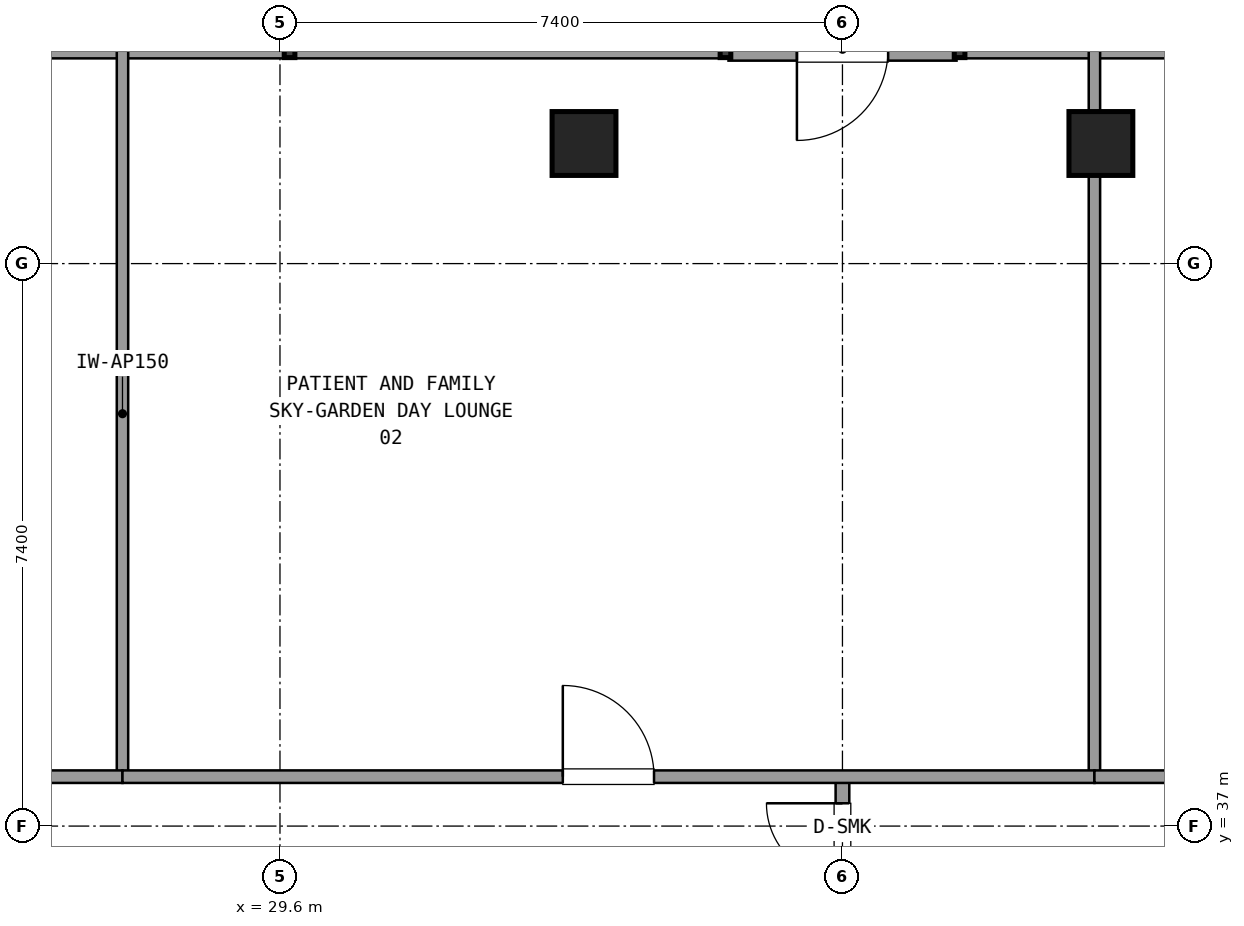
"""IFC4 building model, lengths in metres.
Left out: names, types, materials, properties, quantities, classifications, styles, units other than length and angle.
Written with IfcOpenShell. Run it as: python <this file> out.ifc"""

import sys

from ifc_helpers import new_model, si_unit, direction, frame, frame_2d, origin, origin_2d, place, context, subcontext, project, spatial, rectangle, extrude, element, fill, save


model = new_model("IFC4")
c1 = context("Model", 3, precision=1e-05, world=origin(), true_north=direction((0.0, 1.0)))
c2 = subcontext(c1, "Body", "Model", "MODEL_VIEW")
j1 = project(units=[si_unit("LENGTHUNIT", "METRE"), si_unit("PLANEANGLEUNIT", "RADIAN")], contexts=[c1])
p1 = place(None, origin())
s1 = spatial("IfcSite", under=j1, at=p1, CompositionType="ELEMENT")
p2 = place(p1, origin())
s2 = spatial("IfcBuilding", under=s1, at=p2, CompositionType="ELEMENT")
p3 = place(p2, frame((0.0, 0.0, 275.22)))
s3 = spatial("IfcBuildingStorey", under=s2, at=p3, CompositionType="ELEMENT", Elevation=275.22)
for number, where, z_axis, x_axis in (
    (1, (40.4, 45.98, 0.0), (0.0, 0.0, 1.0), (1.0, 0.0, 0.0)),
    (2, (33.6, 45.98, 0.0), (0.0, 0.0, 1.0), (1.0, 0.0, 0.0)),
):
    element("IfcColumn", number, at=place(p3, frame(where, z_axis=z_axis, x_axis=x_axis)), inside=s3, PredefinedType="COLUMN", context=c2, shape_type="SweptSolid", body=[
        extrude(rectangle(XDim=0.84, YDim=0.84, at=origin_2d()), origin(), (0.0, 0.0, 1.0), 3.6),
    ])
p4 = place(p3, frame((38.501, 47.22, 0.0), z_axis=(0.0, 0.0, 1.0), x_axis=(-1.0, 0.0, 0.0)))
e3 = element("IfcWall", 3, at=p4, inside=s3, PredefinedType="SOLIDWALL", context=c2, shape_type="SweptSolid", body=[
    extrude(rectangle(XDim=3.0, YDim=0.3, at=frame_2d((1.5, 0.0))), origin(), (0.0, 0.0, 1.0), 2.69),
])
p5 = place(p4, frame((0.9, 0.0, 0.0)))
e4 = element("IfcOpeningElement", 4, at=p5, cuts=e3, PredefinedType="OPENING", context=c2, shape_type="SweptSolid", body=[
    extrude(rectangle(XDim=1.2, YDim=2.2, at=frame_2d((0.6, 1.1))), frame((0.0, 0.16, 0.0), z_axis=(0.0, -1.0, 0.0), x_axis=(1.0, 0.0, 0.0)), (0.0, 0.0, 1.0), 0.32),
])
p6 = place(p3, frame((55.745, 47.22, 0.0), z_axis=(0.0, 0.0, 1.0), x_axis=(-1.0, 0.0, 0.0)))
e5 = element("IfcWall", 5, at=p6, inside=s3, PredefinedType="SOLIDWALL", context=c2, shape_type="SweptSolid", body=[
    extrude(rectangle(XDim=17.204, YDim=0.24, at=frame_2d((8.602, 0.0))), origin(), (0.0, 0.0, 1.0), 0.85),
])
p7 = place(p3, frame((35.461, 47.22, 0.0), z_axis=(0.0, 0.0, 1.0), x_axis=(-1.0, 0.0, 0.0)))
e6 = element("IfcWall", 6, at=p7, inside=s3, PredefinedType="SOLIDWALL", context=c2, shape_type="SweptSolid", body=[
    extrude(rectangle(XDim=17.206, YDim=0.24, at=frame_2d((8.603, 0.0))), origin(), (0.0, 0.0, 1.0), 0.85),
])
p8 = place(p3, frame((37.0, 34.95, 0.0), z_axis=(0.0, 0.0, 1.0), x_axis=(0.0, 1.0, 0.0)))
e7 = element("IfcWall", 7, at=p8, inside=s3, PredefinedType="PARTITIONING", context=c2, shape_type="SweptSolid", body=[
    extrude(rectangle(XDim=2.7, YDim=0.18, at=frame_2d((1.35, 0.0))), origin(), (0.0, 0.0, 1.0), 2.61),
])
p9 = place(p8, frame((0.35, 0.0, 0.0)))
e8 = element("IfcOpeningElement", 8, at=p9, cuts=e7, PredefinedType="OPENING", context=c2, shape_type="SweptSolid", body=[
    extrude(rectangle(XDim=2.0, YDim=2.2, at=frame_2d((1.0, 1.1))), frame((0.0, 0.1, 0.0), z_axis=(0.0, -1.0, 0.0), x_axis=(1.0, 0.0, 0.0)), (0.0, 0.0, 1.0), 0.2),
])
p10 = place(p3, frame((27.528, 37.65, 0.0), z_axis=(0.0, 0.0, 1.0), x_axis=(0.0, 1.0, 0.0)))
e9 = element("IfcWall", 9, at=p10, inside=s3, PredefinedType="PARTITIONING", context=c2, shape_type="SweptSolid", body=[
    extrude(rectangle(XDim=9.55, YDim=0.15, at=frame_2d((4.775, 0.0))), origin(), (0.0, 0.0, 1.0), 2.61),
])
p11 = place(p3, frame((21.1, 37.65, 0.0), z_axis=(0.0, 0.0, 1.0), x_axis=(1.0, 0.0, 0.0)))
e10 = element("IfcWall", 10, at=p11, inside=s3, PredefinedType="PARTITIONING", context=c2, shape_type="SweptSolid", body=[
    extrude(rectangle(XDim=6.428, YDim=0.165, at=frame_2d((3.214, 0.0))), origin(), (0.0, 0.0, 1.0), 2.61),
])
p12 = place(p11, frame((2.614, 0.0, 0.0)))
e11 = element("IfcOpeningElement", 11, at=p12, cuts=e10, PredefinedType="OPENING", context=c2, shape_type="SweptSolid", body=[
    extrude(rectangle(XDim=1.2, YDim=2.15, at=frame_2d((0.6, 1.075))), frame((0.0, 0.093, 0.0), z_axis=(0.0, -1.0, 0.0), x_axis=(1.0, 0.0, 0.0)), (0.0, 0.0, 1.0), 0.185),
])
p13 = place(p3, frame((40.315, 37.65, 0.0), z_axis=(0.0, 0.0, 1.0), x_axis=(0.0, 1.0, 0.0)))
e12 = element("IfcWall", 12, at=p13, inside=s3, PredefinedType="PARTITIONING", context=c2, shape_type="SweptSolid", body=[
    extrude(rectangle(XDim=9.55, YDim=0.15, at=frame_2d((4.775, 0.0))), origin(), (0.0, 0.0, 1.0), 2.61),
])
p14 = place(p3, frame((27.528, 37.65, 0.0), z_axis=(0.0, 0.0, 1.0), x_axis=(1.0, 0.0, 0.0)))
e13 = element("IfcWall", 13, at=p14, inside=s3, PredefinedType="PARTITIONING", context=c2, shape_type="SweptSolid", body=[
    extrude(rectangle(XDim=12.787, YDim=0.165, at=frame_2d((6.394, 0.0))), origin(), (0.0, 0.0, 1.0), 2.61),
])
p15 = place(p14, frame((5.793, 0.0, 0.0)))
e14 = element("IfcOpeningElement", 14, at=p15, cuts=e13, PredefinedType="OPENING", context=c2, shape_type="SweptSolid", body=[
    extrude(rectangle(XDim=1.2, YDim=2.15, at=frame_2d((0.6, 1.075))), frame((0.0, 0.093, 0.0), z_axis=(0.0, -1.0, 0.0), x_axis=(1.0, 0.0, 0.0)), (0.0, 0.0, 1.0), 0.185),
])
p16 = place(p3, frame((40.315, 37.65, 0.0), z_axis=(0.0, 0.0, 1.0), x_axis=(1.0, 0.0, 0.0)))
e15 = element("IfcWall", 15, at=p16, inside=s3, PredefinedType="PARTITIONING", context=c2, shape_type="SweptSolid", body=[
    extrude(rectangle(XDim=10.035, YDim=0.165, at=frame_2d((5.018, 0.0))), origin(), (0.0, 0.0, 1.0), 2.61),
])
p17 = place(p16, frame((4.418, 0.0, 0.0)))
e16 = element("IfcOpeningElement", 16, at=p17, cuts=e15, PredefinedType="OPENING", context=c2, shape_type="SweptSolid", body=[
    extrude(rectangle(XDim=1.2, YDim=2.15, at=frame_2d((0.6, 1.075))), frame((0.0, 0.093, 0.0), z_axis=(0.0, -1.0, 0.0), x_axis=(1.0, 0.0, 0.0)), (0.0, 0.0, 1.0), 0.185),
])
p18 = place(p9, origin())
e17 = element("IfcDoor", 17, at=p18, inside=s3, OperationType="DOUBLE_DOOR_SINGLE_SWING", PredefinedType="DOOR", context=c2, shape_type="SweptSolid", body=[
    extrude(rectangle(XDim=2.0, YDim=2.2, at=frame_2d((1.0, 1.1))), frame((0.0, 0.025, 0.0), z_axis=(0.0, -1.0, 0.0), x_axis=(1.0, 0.0, 0.0)), (0.0, 0.0, 1.0), 0.05),
])
fill(e8, e17)
p19 = place(p15, origin())
e18 = element("IfcDoor", 18, at=p19, inside=s3, OperationType="SINGLE_SWING_LEFT", PredefinedType="DOOR", context=c2, shape_type="SweptSolid", body=[
    extrude(rectangle(XDim=1.2, YDim=2.15, at=frame_2d((0.6, 1.075))), frame((0.0, 0.025, 0.0), z_axis=(0.0, -1.0, 0.0), x_axis=(1.0, 0.0, 0.0)), (0.0, 0.0, 1.0), 0.05),
])
fill(e14, e18)
save(model, sys.argv[1])
